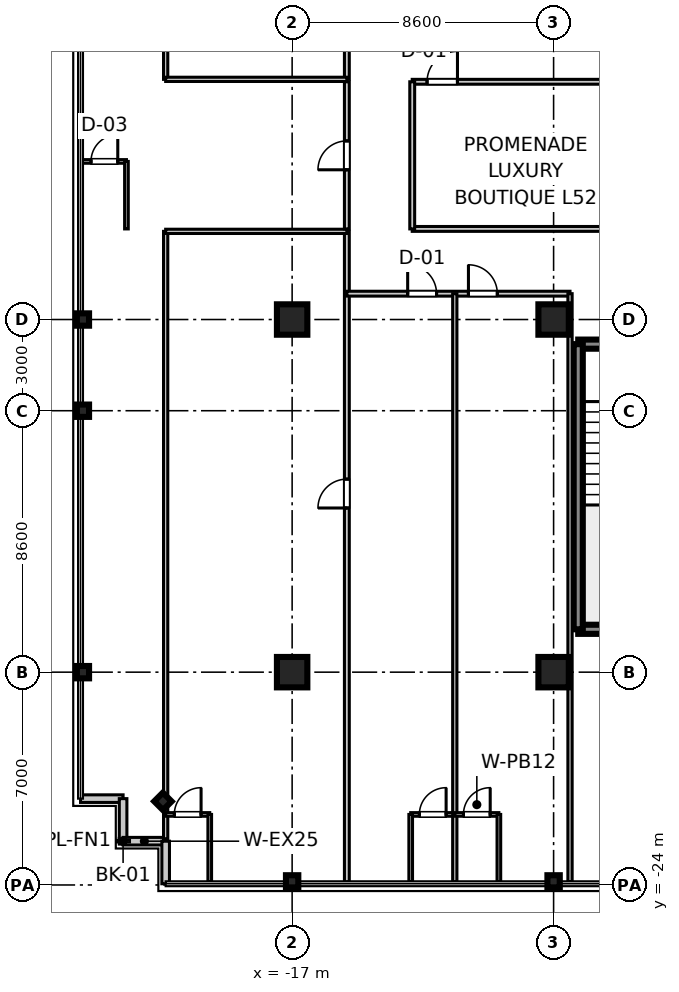
"""IFC4 building model, lengths in metres.
Left out: names, types, materials, properties, quantities, classifications, styles, units other than length and angle.
Written with IfcOpenShell. Run it as: python <this file> out.ifc"""

import sys

from ifc_helpers import new_model, si_unit, direction, frame, frame_2d, origin, origin_2d, place, context, subcontext, project, spatial, rectangle, i_section, extrude, source, transform, mapped, element, fill, save


model = new_model("IFC4")
c1 = context("Model", 3, precision=1e-05, world=origin(), true_north=direction((0.0, 1.0)))
c2 = subcontext(c1, "Body", "Model", "MODEL_VIEW")
j1 = project(units=[si_unit("LENGTHUNIT", "METRE"), si_unit("PLANEANGLEUNIT", "RADIAN")], contexts=[c1])
p1 = place(None, origin())
s1 = spatial("IfcSite", under=j1, at=p1, CompositionType="ELEMENT")
p2 = place(p1, origin())
s2 = spatial("IfcBuilding", under=s1, at=p2, CompositionType="ELEMENT")
p3 = place(p2, frame((0.0, 0.0, 204.9)))
s3 = spatial("IfcBuildingStorey", under=s2, at=p3, CompositionType="ELEMENT", Elevation=204.9)
m1 = source(origin(), c2, "Body", "SweptSolid", [
    extrude(rectangle(XDim=1.0, YDim=1.0, at=origin_2d()), origin(), (0.0, 0.0, 1.0), 3.655),
])
for number, where, z_axis, x_axis in (
    (1, (-17.0, -17.0, 0.0), (0.0, 0.0, 1.0), (1.0, 0.0, 0.0)),
    (2, (-17.0, -5.4, 0.0), (0.0, 0.0, 1.0), (1.0, 0.0, 0.0)),
    (3, (-8.4, -17.0, 0.0), (0.0, 0.0, 1.0), (1.0, 0.0, 0.0)),
    (4, (-8.4, -5.4, 0.0), (0.0, 0.0, 1.0), (1.0, 0.0, 0.0)),
):
    element("IfcColumn", number, at=place(p3, frame(where, z_axis=z_axis, x_axis=x_axis)), inside=s3, PredefinedType="COLUMN", context=c2, shape_type="MappedRepresentation", body=[
        mapped(m1, transform((0.0, 0.0, 0.0), scale=1.0)),
    ])
m2 = source(origin(), c2, "Body", "SweptSolid", [
    extrude(i_section(OverallWidth=0.401, OverallDepth=0.406, WebThickness=0.016, FlangeThickness=0.025, at=origin_2d()), origin(), (0.0, 0.0, 1.0), 3.655),
])
for number, where, z_axis, x_axis in (
    (5, (-23.88, -17.0, 0.0), (0.0, 0.0, 1.0), (1.0, 0.0, 0.0)),
    (6, (-23.88, -8.4, 0.0), (0.0, 0.0, 1.0), (1.0, 0.0, 0.0)),
    (7, (-23.88, -5.4, 0.0), (0.0, 0.0, 1.0), (1.0, 0.0, 0.0)),
    (8, (-17.0, -23.88, 0.0), (0.0, 0.0, 1.0), (0.0, 1.0, 0.0)),
    (9, (-8.4, -23.88, 0.0), (0.0, 0.0, 1.0), (0.0, 1.0, 0.0)),
    (10, (-21.25, -21.25, 0.0), (0.0, 0.0, 1.0), (0.707, 0.707, 0.0)),
):
    element("IfcColumn", number, at=place(p3, frame(where, z_axis=z_axis, x_axis=x_axis)), inside=s3, PredefinedType="COLUMN", context=c2, shape_type="MappedRepresentation", body=[
        mapped(m2, transform((0.0, 0.0, 0.0), scale=1.0)),
    ])
m3 = source(origin(), c2, "Body", "SweptSolid", [
    extrude(rectangle(XDim=3.98, YDim=0.3, at=frame_2d((1.99, 0.0))), origin(), (0.0, 0.0, 1.0), 3.41),
])
p4 = place(p3, frame((-7.59, -15.59, 0.0), z_axis=(0.0, 0.0, 1.0), x_axis=(1.0, 0.0, 0.0)))
e11 = element("IfcWall", 11, at=p4, inside=s3, PredefinedType="SHEAR", context=c2, shape_type="MappedRepresentation", body=[
    mapped(m3, transform((0.0, 0.0, 0.0), scale=1.0)),
])
p5 = place(p3, frame((-7.59, -6.21, 0.0), z_axis=(0.0, 0.0, 1.0), x_axis=(1.0, 0.0, 0.0)))
e12 = element("IfcWall", 12, at=p5, inside=s3, PredefinedType="SHEAR", context=c2, shape_type="MappedRepresentation", body=[
    mapped(m3, transform((0.0, 0.0, 0.0), scale=1.0)),
])
p6 = place(p5, frame((1.44, 0.0, 0.0)))
e13 = element("IfcOpeningElement", 13, at=p6, cuts=e12, PredefinedType="OPENING", context=c2, shape_type="SweptSolid", body=[
    extrude(rectangle(XDim=1.1, YDim=2.15, at=frame_2d((0.55, 1.075))), frame((0.0, 0.16, 0.0), z_axis=(0.0, -1.0, 0.0), x_axis=(1.0, 0.0, 0.0)), (0.0, 0.0, 1.0), 0.32),
])
m4 = source(origin(), c2, "Body", "SweptSolid", [
    extrude(rectangle(XDim=9.38, YDim=0.3, at=frame_2d((4.69, 0.0))), origin(), (0.0, 0.0, 1.0), 3.41),
])
p7 = place(p3, frame((-7.59, -15.59, 0.0), z_axis=(0.0, 0.0, 1.0), x_axis=(0.0, 1.0, 0.0)))
e14 = element("IfcWall", 14, at=p7, inside=s3, PredefinedType="SHEAR", context=c2, shape_type="MappedRepresentation", body=[
    mapped(m4, transform((0.0, 0.0, 0.0), scale=1.0)),
])
m5 = source(origin(), c2, "Body", "SweptSolid", [
    extrude(rectangle(XDim=1.4, YDim=0.25, at=frame_2d((0.7, 0.0))), origin(), (0.0, 0.0, 1.0), 3.41),
])
p8 = place(p3, frame((-23.96, -21.16, 0.0), z_axis=(0.0, 0.0, 1.0), x_axis=(1.0, 0.0, 0.0)))
e15 = element("IfcWall", 15, at=p8, inside=s3, PredefinedType="STANDARD", context=c2, shape_type="MappedRepresentation", body=[
    mapped(m5, transform((0.0, 0.0, 0.0), scale=1.0)),
])
m6 = source(origin(), c2, "Body", "SweptSolid", [
    extrude(rectangle(XDim=1.4, YDim=0.25, at=frame_2d((0.7, 0.0))), origin(), (0.0, 0.0, 1.0), 3.41),
])
for number, where, z_axis, x_axis in (
    (16, (-22.56, -22.56, 0.0), (0.0, 0.0, 1.0), (0.0, 1.0, 0.0)),
    (17, (-22.56, -22.56, 0.0), (0.0, 0.0, 1.0), (1.0, 0.0, 0.0)),
):
    element("IfcWall", number, at=place(p3, frame(where, z_axis=z_axis, x_axis=x_axis)), inside=s3, PredefinedType="STANDARD", context=c2, shape_type="MappedRepresentation", body=[
        mapped(m6, transform((0.0, 0.0, 0.0), scale=1.0)),
    ])
p9 = place(p3, frame((-21.16, -23.96, 0.0), z_axis=(0.0, 0.0, 1.0), x_axis=(0.0, 1.0, 0.0)))
e18 = element("IfcWall", 18, at=p9, inside=s3, PredefinedType="STANDARD", context=c2, shape_type="MappedRepresentation", body=[
    mapped(m5, transform((0.0, 0.0, 0.0), scale=1.0)),
])
m7 = source(origin(), c2, "Body", "SweptSolid", [
    extrude(rectangle(XDim=21.4, YDim=0.16, at=frame_2d((10.7, 0.0))), origin(), (0.0, 0.0, 1.0), 2.75),
])
p10 = place(p3, frame((-15.2, 2.5, 0.0), z_axis=(0.0, 0.0, 1.0), x_axis=(0.0, 1.0, 0.0)))
e19 = element("IfcWall", 19, at=p10, inside=s3, PredefinedType="PARTITIONING", context=c2, shape_type="MappedRepresentation", body=[
    mapped(m7, transform((0.0, 0.0, 0.0), scale=1.0)),
])
p11 = place(p10, frame((8.15, 0.0, 0.0)))
e20 = element("IfcOpeningElement", 20, at=p11, cuts=e19, PredefinedType="OPENING", context=c2, shape_type="SweptSolid", body=[
    extrude(rectangle(XDim=0.95, YDim=2.1, at=frame_2d((0.475, 1.05))), frame((0.0, 0.09, 0.0), z_axis=(0.0, -1.0, 0.0), x_axis=(1.0, 0.0, 0.0)), (0.0, 0.0, 1.0), 0.18),
])
m8 = source(origin(), c2, "Body", "SweptSolid", [
    extrude(rectangle(XDim=19.98, YDim=0.14, at=frame_2d((9.99, 0.0))), origin(), (0.0, 0.0, 1.0), 2.75),
])
p12 = place(p3, frame((-21.16, 2.5, 0.0), z_axis=(0.0, 0.0, 1.0), x_axis=(0.0, 1.0, 0.0)))
e21 = element("IfcWall", 21, at=p12, inside=s3, PredefinedType="PARTITIONING", context=c2, shape_type="MappedRepresentation", body=[
    mapped(m8, transform((0.0, 0.0, 0.0), scale=1.0)),
])
m9 = source(origin(), c2, "Body", "SweptSolid", [
    extrude(rectangle(XDim=5.96, YDim=0.14, at=frame_2d((2.98, 0.0))), origin(), (0.0, 0.0, 1.0), 2.75),
])
p13 = place(p3, frame((-21.16, 2.5, 0.0), z_axis=(0.0, 0.0, 1.0), x_axis=(1.0, 0.0, 0.0)))
e22 = element("IfcWall", 22, at=p13, inside=s3, PredefinedType="PARTITIONING", context=c2, shape_type="MappedRepresentation", body=[
    mapped(m9, transform((0.0, 0.0, 0.0), scale=1.0)),
])
p14 = place(p3, frame((-15.2, -23.9, 0.0), z_axis=(0.0, 0.0, 1.0), x_axis=(0.0, 1.0, 0.0)))
e23 = element("IfcWall", 23, at=p14, inside=s3, PredefinedType="PARTITIONING", context=c2, shape_type="MappedRepresentation", body=[
    mapped(m7, transform((0.0, 0.0, 0.0), scale=1.0)),
])
p15 = place(p14, frame((12.3, 0.0, 0.0)))
e24 = element("IfcOpeningElement", 24, at=p15, cuts=e23, PredefinedType="OPENING", context=c2, shape_type="SweptSolid", body=[
    extrude(rectangle(XDim=0.95, YDim=2.1, at=frame_2d((0.475, 1.05))), frame((0.0, 0.09, 0.0), z_axis=(0.0, -1.0, 0.0), x_axis=(1.0, 0.0, 0.0)), (0.0, 0.0, 1.0), 0.18),
])
p16 = place(p3, frame((-21.16, -22.48, 0.0), z_axis=(0.0, 0.0, 1.0), x_axis=(0.0, 1.0, 0.0)))
e25 = element("IfcWall", 25, at=p16, inside=s3, PredefinedType="PARTITIONING", context=c2, shape_type="MappedRepresentation", body=[
    mapped(m8, transform((0.0, 0.0, 0.0), scale=1.0)),
])
p17 = place(p3, frame((-21.16, -2.5, 0.0), z_axis=(0.0, 0.0, 1.0), x_axis=(1.0, 0.0, 0.0)))
e26 = element("IfcWall", 26, at=p17, inside=s3, PredefinedType="PARTITIONING", context=c2, shape_type="MappedRepresentation", body=[
    mapped(m9, transform((0.0, 0.0, 0.0), scale=1.0)),
])
m10 = source(origin(), c2, "Body", "SweptSolid", [
    extrude(rectangle(XDim=1.45, YDim=0.12, at=frame_2d((0.725, 0.0))), origin(), (0.0, 0.0, 1.0), 2.75),
])
p18 = place(p3, frame((-21.16, -21.68, 0.0), z_axis=(0.0, 0.0, 1.0), x_axis=(1.0, 0.0, 0.0)))
e27 = element("IfcWall", 27, at=p18, inside=s3, PredefinedType="PARTITIONING", context=c2, shape_type="MappedRepresentation", body=[
    mapped(m10, transform((0.0, 0.0, 0.0), scale=1.0)),
])
p19 = place(p18, frame((0.285, 0.0, 0.0)))
e28 = element("IfcOpeningElement", 28, at=p19, cuts=e27, PredefinedType="OPENING", context=c2, shape_type="SweptSolid", body=[
    extrude(rectangle(XDim=0.88, YDim=2.1, at=frame_2d((0.44, 1.05))), frame((0.0, 0.07, 0.0), z_axis=(0.0, -1.0, 0.0), x_axis=(1.0, 0.0, 0.0)), (0.0, 0.0, 1.0), 0.14),
])
m11 = source(origin(), c2, "Body", "SweptSolid", [
    extrude(rectangle(XDim=2.22, YDim=0.12, at=frame_2d((1.11, 0.0))), origin(), (0.0, 0.0, 1.0), 2.75),
])
p20 = place(p3, frame((-19.71, -23.9, 0.0), z_axis=(0.0, 0.0, 1.0), x_axis=(0.0, 1.0, 0.0)))
e29 = element("IfcWall", 29, at=p20, inside=s3, PredefinedType="PARTITIONING", context=c2, shape_type="MappedRepresentation", body=[
    mapped(m11, transform((0.0, 0.0, 0.0), scale=1.0)),
])
m12 = source(origin(), c2, "Body", "SweptSolid", [
    extrude(rectangle(XDim=7.34, YDim=0.16, at=frame_2d((3.67, 0.0))), origin(), (0.0, 0.0, 1.0), 2.75),
])
p21 = place(p3, frame((-15.2, -4.55, 0.0), z_axis=(0.0, 0.0, 1.0), x_axis=(1.0, 0.0, 0.0)))
e30 = element("IfcWall", 30, at=p21, inside=s3, PredefinedType="PARTITIONING", context=c2, shape_type="MappedRepresentation", body=[
    mapped(m12, transform((0.0, 0.0, 0.0), scale=1.0)),
])
p22 = place(p21, frame((2.0, 0.0, 0.0)))
e31 = element("IfcOpeningElement", 31, at=p22, cuts=e30, PredefinedType="OPENING", context=c2, shape_type="SweptSolid", body=[
    extrude(rectangle(XDim=0.95, YDim=2.1, at=frame_2d((0.475, 1.05))), frame((0.0, 0.09, 0.0), z_axis=(0.0, -1.0, 0.0), x_axis=(1.0, 0.0, 0.0)), (0.0, 0.0, 1.0), 0.18),
])
p23 = place(p21, frame((3.999, 0.0, 0.0)))
e32 = element("IfcOpeningElement", 32, at=p23, cuts=e30, PredefinedType="OPENING", context=c2, shape_type="SweptSolid", body=[
    extrude(rectangle(XDim=0.95, YDim=2.1, at=frame_2d((0.475, 1.05))), frame((0.0, 0.09, 0.0), z_axis=(0.0, -1.0, 0.0), x_axis=(1.0, 0.0, 0.0)), (0.0, 0.0, 1.0), 0.18),
])
m13 = source(origin(), c2, "Body", "SweptSolid", [
    extrude(rectangle(XDim=19.35, YDim=0.14, at=frame_2d((9.675, 0.0))), origin(), (0.0, 0.0, 1.0), 2.75),
])
p24 = place(p3, frame((-7.86, -23.9, 0.0), z_axis=(0.0, 0.0, 1.0), x_axis=(0.0, 1.0, 0.0)))
e33 = element("IfcWall", 33, at=p24, inside=s3, PredefinedType="PARTITIONING", context=c2, shape_type="MappedRepresentation", body=[
    mapped(m13, transform((0.0, 0.0, 0.0), scale=1.0)),
])
m14 = source(origin(), c2, "Body", "SweptSolid", [
    extrude(rectangle(XDim=1.45, YDim=0.12, at=frame_2d((0.725, 0.0))), origin(), (0.0, 0.0, 1.0), 2.75),
])
p25 = place(p3, frame((-13.1, -21.68, 0.0), z_axis=(0.0, 0.0, 1.0), x_axis=(1.0, 0.0, 0.0)))
e34 = element("IfcWall", 34, at=p25, inside=s3, PredefinedType="PARTITIONING", context=c2, shape_type="MappedRepresentation", body=[
    mapped(m14, transform((0.0, 0.0, 0.0), scale=1.0)),
])
p26 = place(p25, frame((0.285, 0.0, 0.0)))
e35 = element("IfcOpeningElement", 35, at=p26, cuts=e34, PredefinedType="OPENING", context=c2, shape_type="SweptSolid", body=[
    extrude(rectangle(XDim=0.88, YDim=2.1, at=frame_2d((0.44, 1.05))), frame((0.0, 0.07, 0.0), z_axis=(0.0, -1.0, 0.0), x_axis=(1.0, 0.0, 0.0)), (0.0, 0.0, 1.0), 0.14),
])
p27 = place(p3, frame((-13.1, -23.9, 0.0), z_axis=(0.0, 0.0, 1.0), x_axis=(0.0, 1.0, 0.0)))
e36 = element("IfcWall", 36, at=p27, inside=s3, PredefinedType="PARTITIONING", context=c2, shape_type="MappedRepresentation", body=[
    mapped(m11, transform((0.0, 0.0, 0.0), scale=1.0)),
])
p28 = place(p3, frame((-11.65, -23.9, 0.0), z_axis=(0.0, 0.0, 1.0), x_axis=(0.0, 1.0, 0.0)))
e37 = element("IfcWall", 37, at=p28, inside=s3, PredefinedType="PARTITIONING", context=c2, shape_type="MappedRepresentation", body=[
    mapped(m13, transform((0.0, 0.0, 0.0), scale=1.0)),
])
p29 = place(p3, frame((-11.65, -21.68, 0.0), z_axis=(0.0, 0.0, 1.0), x_axis=(1.0, 0.0, 0.0)))
e38 = element("IfcWall", 38, at=p29, inside=s3, PredefinedType="PARTITIONING", context=c2, shape_type="MappedRepresentation", body=[
    mapped(m10, transform((0.0, 0.0, 0.0), scale=1.0)),
])
p30 = place(p29, frame((0.285, 0.0, 0.0)))
e39 = element("IfcOpeningElement", 39, at=p30, cuts=e38, PredefinedType="OPENING", context=c2, shape_type="SweptSolid", body=[
    extrude(rectangle(XDim=0.88, YDim=2.1, at=frame_2d((0.44, 1.05))), frame((0.0, 0.07, 0.0), z_axis=(0.0, -1.0, 0.0), x_axis=(1.0, 0.0, 0.0)), (0.0, 0.0, 1.0), 0.14),
])
p31 = place(p3, frame((-10.2, -23.9, 0.0), z_axis=(0.0, 0.0, 1.0), x_axis=(0.0, 1.0, 0.0)))
e40 = element("IfcWall", 40, at=p31, inside=s3, PredefinedType="PARTITIONING", context=c2, shape_type="MappedRepresentation", body=[
    mapped(m11, transform((0.0, 0.0, 0.0), scale=1.0)),
])
m15 = source(origin(), c2, "Body", "SweptSolid", [
    extrude(rectangle(XDim=4.84, YDim=0.16, at=frame_2d((2.42, 0.0))), origin(), (0.0, 0.0, 1.0), 2.75),
])
p32 = place(p3, frame((-15.2, -2.42, 0.0), z_axis=(0.0, 0.0, 1.0), x_axis=(0.0, 1.0, 0.0)))
e41 = element("IfcWall", 41, at=p32, inside=s3, PredefinedType="PARTITIONING", context=c2, shape_type="MappedRepresentation", body=[
    mapped(m15, transform((0.0, 0.0, 0.0), scale=1.0)),
])
p33 = place(p32, frame((1.945, 0.0, 0.0)))
e42 = element("IfcOpeningElement", 42, at=p33, cuts=e41, PredefinedType="OPENING", context=c2, shape_type="SweptSolid", body=[
    extrude(rectangle(XDim=0.95, YDim=2.1, at=frame_2d((0.475, 1.05))), frame((0.0, 0.09, 0.0), z_axis=(0.0, -1.0, 0.0), x_axis=(1.0, 0.0, 0.0)), (0.0, 0.0, 1.0), 0.18),
])
p34 = place(p3, frame((-23.9, -0.2, 0.0), z_axis=(0.0, 0.0, 1.0), x_axis=(1.0, 0.0, 0.0)))
e43 = element("IfcWall", 43, at=p34, inside=s3, PredefinedType="PARTITIONING", context=c2, shape_type="MappedRepresentation", body=[
    mapped(m10, transform((0.0, 0.0, 0.0), scale=1.0)),
])
p35 = place(p34, frame((0.285, 0.0, 0.0)))
e44 = element("IfcOpeningElement", 44, at=p35, cuts=e43, PredefinedType="OPENING", context=c2, shape_type="SweptSolid", body=[
    extrude(rectangle(XDim=0.88, YDim=2.1, at=frame_2d((0.44, 1.05))), frame((0.0, 0.07, 0.0), z_axis=(0.0, -1.0, 0.0), x_axis=(1.0, 0.0, 0.0)), (0.0, 0.0, 1.0), 0.14),
])
p36 = place(p3, frame((-22.45, -2.42, 0.0), z_axis=(0.0, 0.0, 1.0), x_axis=(0.0, 1.0, 0.0)))
e45 = element("IfcWall", 45, at=p36, inside=s3, PredefinedType="PARTITIONING", context=c2, shape_type="MappedRepresentation", body=[
    mapped(m11, transform((0.0, 0.0, 0.0), scale=1.0)),
])
m16 = source(origin(), c2, "Body", "SweptSolid", [
    extrude(rectangle(XDim=6.732, YDim=0.16, at=frame_2d((3.366, 0.0))), origin(), (0.0, 0.0, 1.0), 2.75),
])
p37 = place(p3, frame((-13.05, -2.42, 0.0), z_axis=(0.0, 0.0, 1.0), x_axis=(1.0, 0.0, 0.0)))
e46 = element("IfcWall", 46, at=p37, inside=s3, PredefinedType="PARTITIONING", context=c2, shape_type="MappedRepresentation", body=[
    mapped(m16, transform((0.0, 0.0, 0.0), scale=1.0)),
])
p38 = place(p3, frame((-13.05, 2.42, 0.0), z_axis=(0.0, 0.0, 1.0), x_axis=(1.0, 0.0, 0.0)))
e47 = element("IfcWall", 47, at=p38, inside=s3, PredefinedType="PARTITIONING", context=c2, shape_type="MappedRepresentation", body=[
    mapped(m16, transform((0.0, 0.0, 0.0), scale=1.0)),
])
p39 = place(p38, frame((0.488, 0.0, 0.0)))
e48 = element("IfcOpeningElement", 48, at=p39, cuts=e47, PredefinedType="OPENING", context=c2, shape_type="SweptSolid", body=[
    extrude(rectangle(XDim=1.0, YDim=2.1, at=frame_2d((0.5, 1.05))), frame((0.0, 0.09, 0.0), z_axis=(0.0, -1.0, 0.0), x_axis=(1.0, 0.0, 0.0)), (0.0, 0.0, 1.0), 0.18),
])
p40 = place(p3, frame((-13.05, -2.42, 0.0), z_axis=(0.0, 0.0, 1.0), x_axis=(0.0, 1.0, 0.0)))
e49 = element("IfcWall", 49, at=p40, inside=s3, PredefinedType="PARTITIONING", context=c2, shape_type="MappedRepresentation", body=[
    mapped(m15, transform((0.0, 0.0, 0.0), scale=1.0)),
])
m17 = source(origin(), c2, "Body", "SweptSolid", [
    extrude(rectangle(XDim=0.88, YDim=2.1, at=frame_2d((0.44, 1.05))), frame((0.0, 0.025, 0.0), z_axis=(0.0, -1.0, 0.0), x_axis=(1.0, 0.0, 0.0)), (0.0, 0.0, 1.0), 0.05),
])
p41 = place(p19, frame((0.88, 0.0, 0.0), z_axis=(0.0, 0.0, 1.0), x_axis=(-1.0, 0.0, 0.0)))
e50 = element("IfcDoor", 50, at=p41, inside=s3, OperationType="SINGLE_SWING_RIGHT", PredefinedType="DOOR", context=c2, shape_type="MappedRepresentation", body=[
    mapped(m17, transform((0.0, 0.0, 0.0), scale=1.0)),
])
fill(e28, e50)
m18 = source(origin(), c2, "Body", "SweptSolid", [
    extrude(rectangle(XDim=0.95, YDim=2.1, at=frame_2d((0.475, 1.05))), frame((0.0, 0.025, 0.0), z_axis=(0.0, -1.0, 0.0), x_axis=(1.0, 0.0, 0.0)), (0.0, 0.0, 1.0), 0.05),
])
p42 = place(p15, origin())
e51 = element("IfcDoor", 51, at=p42, inside=s3, OperationType="SINGLE_SWING_LEFT", PredefinedType="DOOR", context=c2, shape_type="MappedRepresentation", body=[
    mapped(m18, transform((0.0, 0.0, 0.0), scale=1.0)),
])
fill(e24, e51)
p43 = place(p26, frame((0.88, 0.0, 0.0), z_axis=(0.0, 0.0, 1.0), x_axis=(-1.0, 0.0, 0.0)))
e52 = element("IfcDoor", 52, at=p43, inside=s3, OperationType="SINGLE_SWING_RIGHT", PredefinedType="DOOR", context=c2, shape_type="MappedRepresentation", body=[
    mapped(m17, transform((0.0, 0.0, 0.0), scale=1.0)),
])
fill(e35, e52)
p44 = place(p22, frame((0.95, 0.0, 0.0), z_axis=(0.0, 0.0, 1.0), x_axis=(-1.0, 0.0, 0.0)))
e53 = element("IfcDoor", 53, at=p44, inside=s3, OperationType="SINGLE_SWING_LEFT", PredefinedType="DOOR", context=c2, shape_type="MappedRepresentation", body=[
    mapped(m18, transform((0.0, 0.0, 0.0), scale=1.0)),
])
fill(e31, e53)
p45 = place(p30, frame((0.88, 0.0, 0.0), z_axis=(0.0, 0.0, 1.0), x_axis=(-1.0, 0.0, 0.0)))
e54 = element("IfcDoor", 54, at=p45, inside=s3, OperationType="SINGLE_SWING_RIGHT", PredefinedType="DOOR", context=c2, shape_type="MappedRepresentation", body=[
    mapped(m17, transform((0.0, 0.0, 0.0), scale=1.0)),
])
fill(e39, e54)
p46 = place(p23, frame((0.95, 0.0, 0.0), z_axis=(0.0, 0.0, 1.0), x_axis=(-1.0, 0.0, 0.0)))
e55 = element("IfcDoor", 55, at=p46, inside=s3, OperationType="SINGLE_SWING_LEFT", PredefinedType="DOOR", context=c2, shape_type="MappedRepresentation", body=[
    mapped(m18, transform((0.0, 0.0, 0.0), scale=1.0)),
])
fill(e32, e55)
p47 = place(p35, frame((0.88, 0.0, 0.0), z_axis=(0.0, 0.0, 1.0), x_axis=(-1.0, 0.0, 0.0)))
e56 = element("IfcDoor", 56, at=p47, inside=s3, OperationType="SINGLE_SWING_RIGHT", PredefinedType="DOOR", context=c2, shape_type="MappedRepresentation", body=[
    mapped(m17, transform((0.0, 0.0, 0.0), scale=1.0)),
])
fill(e44, e56)
p48 = place(p33, origin())
e57 = element("IfcDoor", 57, at=p48, inside=s3, OperationType="SINGLE_SWING_LEFT", PredefinedType="DOOR", context=c2, shape_type="MappedRepresentation", body=[
    mapped(m18, transform((0.0, 0.0, 0.0), scale=1.0)),
])
fill(e42, e57)
m19 = source(origin(), c2, "Body", "SweptSolid", [
    extrude(rectangle(XDim=1.0, YDim=2.1, at=frame_2d((0.5, 1.05))), frame((0.0, 0.025, 0.0), z_axis=(0.0, -1.0, 0.0), x_axis=(1.0, 0.0, 0.0)), (0.0, 0.0, 1.0), 0.05),
])
p49 = place(p39, frame((1.0, 0.0, 0.0), z_axis=(0.0, 0.0, 1.0), x_axis=(-1.0, 0.0, 0.0)))
e58 = element("IfcDoor", 58, at=p49, inside=s3, OperationType="SINGLE_SWING_RIGHT", PredefinedType="DOOR", context=c2, shape_type="MappedRepresentation", body=[
    mapped(m19, transform((0.0, 0.0, 0.0), scale=1.0)),
])
fill(e48, e58)
save(model, sys.argv[1])
